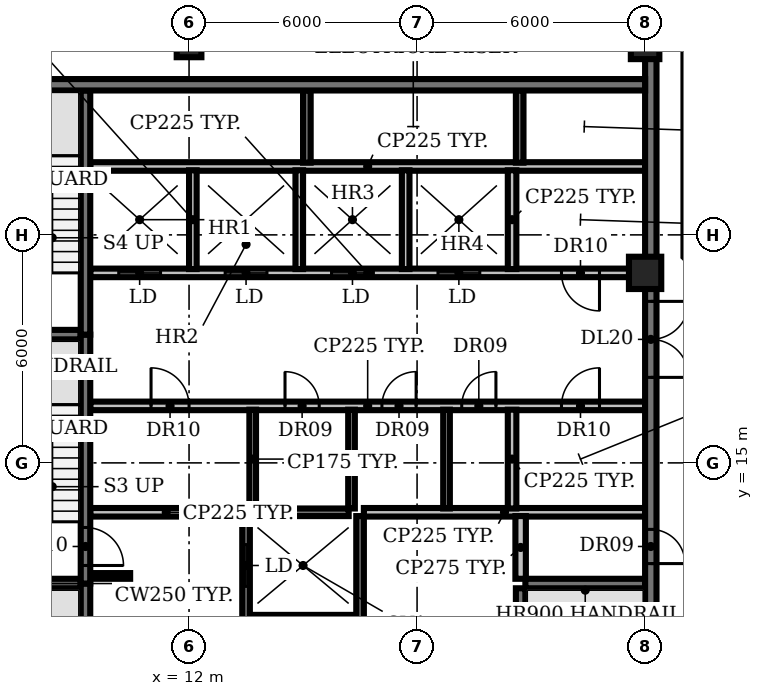
"""IFC4 building model, lengths in metres.
Left out: names, types, materials, properties, quantities, classifications, styles, units other than length and angle.
Written with IfcOpenShell. Run it as: python <this file> out.ifc"""

import sys

from ifc_helpers import new_model, si_unit, direction, frame, frame_2d, origin, origin_2d, place, context, subcontext, project, spatial, rectangle, circle, extrude, element, fill, save


model = new_model("IFC4")
c1 = context("Model", 3, precision=1e-05, world=origin(), true_north=direction((0.0, 1.0)))
c2 = subcontext(c1, "Body", "Model", "MODEL_VIEW")
j1 = project(units=[si_unit("LENGTHUNIT", "METRE"), si_unit("PLANEANGLEUNIT", "RADIAN")], contexts=[c1])
p1 = place(None, origin())
s1 = spatial("IfcSite", under=j1, at=p1, CompositionType="ELEMENT")
p2 = place(p1, origin())
s2 = spatial("IfcBuilding", under=s1, at=p2, CompositionType="ELEMENT")
p3 = place(p2, frame((0.0, 0.0, 281.0)))
s3 = spatial("IfcBuildingStorey", under=s2, at=p3, CompositionType="ELEMENT", Elevation=281.0)
p4 = place(p3, frame((12.0, 26.0, 0.0), z_axis=(0.0, 0.0, 1.0), x_axis=(1.0, 0.0, 0.0)))
e1 = element("IfcColumn", 1, at=p4, inside=s3, PredefinedType="COLUMN", context=c2, shape_type="SweptSolid", body=[
    extrude(rectangle(XDim=0.65, YDim=0.65, at=origin_2d()), origin(), (0.0, 0.0, 1.0), 3.85),
])
p5 = place(p3, frame((24.0, 20.0, 0.0), z_axis=(0.0, 0.0, 1.0), x_axis=(1.0, 0.0, 0.0)))
e2 = element("IfcColumn", 2, at=p5, inside=s3, PredefinedType="COLUMN", context=c2, shape_type="SweptSolid", body=[
    extrude(circle(Radius=0.425, at=origin_2d()), origin(), (0.0, 0.0, 1.0), 3.85),
])
p6 = place(p3, frame((24.0, 26.0, 0.0), z_axis=(0.0, 0.0, 1.0), x_axis=(1.0, 0.0, 0.0)))
e3 = element("IfcColumn", 3, at=p6, inside=s3, PredefinedType="COLUMN", context=c2, shape_type="SweptSolid", body=[
    extrude(rectangle(XDim=0.75, YDim=0.75, at=origin_2d()), origin(), (0.0, 0.0, 1.0), 3.85),
])
p7 = place(p3, frame((13.6, 10.9, 0.0), z_axis=(0.0, 0.0, 1.0), x_axis=(1.0, 0.0, 0.0)))
e4 = element("IfcWall", 4, at=p7, inside=s3, PredefinedType="SHEAR", context=c2, shape_type="SweptSolid", body=[
    extrude(rectangle(XDim=2.8, YDim=0.2, at=frame_2d((1.4, 0.0))), origin(), (0.0, 0.0, 1.0), 3.85),
])
for number, where, z_axis, x_axis in (
    (5, (6.0, 11.825, 0.0), (0.0, 0.0, 1.0), (1.0, 0.0, 0.0)),
    (6, (20.85, 11.825, 0.0), (0.0, 0.0, 1.0), (1.0, 0.0, 0.0)),
):
    element("IfcWall", number, at=place(p3, frame(where, z_axis=z_axis, x_axis=x_axis)), inside=s3, PredefinedType="SHEAR", context=c2, shape_type="SweptSolid", body=[
        extrude(rectangle(XDim=3.15, YDim=0.25, at=frame_2d((1.575, 0.0))), origin(), (0.0, 0.0, 1.0), 3.85),
    ])
p8 = place(p3, frame((9.4, 12.025, 0.0), z_axis=(0.0, 0.0, 1.0), x_axis=(1.0, 0.0, 0.0)))
e7 = element("IfcWall", 7, at=p8, inside=s3, PredefinedType="SHEAR", context=c2, shape_type="SweptSolid", body=[
    extrude(rectangle(XDim=1.05, YDim=0.15, at=frame_2d((0.525, 0.0))), origin(), (0.0, 0.0, 1.0), 3.85),
])
p9 = place(p3, frame((9.4, 13.7, 0.0), z_axis=(0.0, 0.0, 1.0), x_axis=(1.0, 0.0, 0.0)))
e8 = element("IfcWall", 8, at=p9, inside=s3, PredefinedType="PARTITIONING", context=c2, shape_type="SweptSolid", body=[
    extrude(rectangle(XDim=4.0, YDim=0.225, at=frame_2d((2.0, 0.0))), origin(), (0.0, 0.0, 1.0), 3.85),
])
p10 = place(p3, frame((13.75, 13.7, 0.0), z_axis=(0.0, 0.0, 1.0), x_axis=(1.0, 0.0, 0.0)))
e9 = element("IfcWall", 9, at=p10, inside=s3, PredefinedType="SHEAR", context=c2, shape_type="SweptSolid", body=[
    extrude(rectangle(XDim=2.45, YDim=0.2, at=frame_2d((1.225, 0.0))), origin(), (0.0, 0.0, 1.0), 3.85),
])
p11 = place(p3, frame((16.6, 13.7, 0.0), z_axis=(0.0, 0.0, 1.0), x_axis=(1.0, 0.0, 0.0)))
e10 = element("IfcWall", 10, at=p11, inside=s3, PredefinedType="PARTITIONING", context=c2, shape_type="SweptSolid", body=[
    extrude(rectangle(XDim=7.4, YDim=0.225, at=frame_2d((3.7, 0.0))), origin(), (0.0, 0.0, 1.0), 3.85),
])
p12 = place(p3, frame((9.4, 16.5, 0.0), z_axis=(0.0, 0.0, 1.0), x_axis=(1.0, 0.0, 0.0)))
e11 = element("IfcWall", 11, at=p12, inside=s3, PredefinedType="PARTITIONING", context=c2, shape_type="SweptSolid", body=[
    extrude(rectangle(XDim=14.6, YDim=0.225, at=frame_2d((7.3, 0.0))), origin(), (0.0, 0.0, 1.0), 3.85),
])
p13 = place(p12, frame((1.6, 0.0, 0.0)))
e12 = element("IfcOpeningElement", 12, at=p13, cuts=e11, PredefinedType="OPENING", context=c2, shape_type="SweptSolid", body=[
    extrude(rectangle(XDim=1.0, YDim=2.1, at=frame_2d((0.5, 1.05))), frame((0.0, 0.123, 0.0), z_axis=(0.0, -1.0, 0.0), x_axis=(1.0, 0.0, 0.0)), (0.0, 0.0, 1.0), 0.245),
])
p14 = place(p12, frame((5.125, 0.0, 0.0)))
e13 = element("IfcOpeningElement", 13, at=p14, cuts=e11, PredefinedType="OPENING", context=c2, shape_type="SweptSolid", body=[
    extrude(rectangle(XDim=0.9, YDim=2.1, at=frame_2d((0.45, 1.05))), frame((0.0, 0.123, 0.0), z_axis=(0.0, -1.0, 0.0), x_axis=(1.0, 0.0, 0.0)), (0.0, 0.0, 1.0), 0.245),
])
p15 = place(p12, frame((7.675, 0.0, 0.0)))
e14 = element("IfcOpeningElement", 14, at=p15, cuts=e11, PredefinedType="OPENING", context=c2, shape_type="SweptSolid", body=[
    extrude(rectangle(XDim=0.9, YDim=2.1, at=frame_2d((0.45, 1.05))), frame((0.0, 0.123, 0.0), z_axis=(0.0, -1.0, 0.0), x_axis=(1.0, 0.0, 0.0)), (0.0, 0.0, 1.0), 0.245),
])
p16 = place(p12, frame((9.775, 0.0, 0.0)))
e15 = element("IfcOpeningElement", 15, at=p16, cuts=e11, PredefinedType="OPENING", context=c2, shape_type="SweptSolid", body=[
    extrude(rectangle(XDim=0.9, YDim=2.1, at=frame_2d((0.45, 1.05))), frame((0.0, 0.123, 0.0), z_axis=(0.0, -1.0, 0.0), x_axis=(1.0, 0.0, 0.0)), (0.0, 0.0, 1.0), 0.245),
])
p17 = place(p12, frame((12.4, 0.0, 0.0)))
e16 = element("IfcOpeningElement", 16, at=p17, cuts=e11, PredefinedType="OPENING", context=c2, shape_type="SweptSolid", body=[
    extrude(rectangle(XDim=1.0, YDim=2.1, at=frame_2d((0.5, 1.05))), frame((0.0, 0.123, 0.0), z_axis=(0.0, -1.0, 0.0), x_axis=(1.0, 0.0, 0.0)), (0.0, 0.0, 1.0), 0.245),
])
p18 = place(p3, frame((6.0, 18.375, 0.0), z_axis=(0.0, 0.0, 1.0), x_axis=(1.0, 0.0, 0.0)))
e17 = element("IfcWall", 17, at=p18, inside=s3, PredefinedType="SHEAR", context=c2, shape_type="SweptSolid", body=[
    extrude(rectangle(XDim=3.15, YDim=0.25, at=frame_2d((1.575, 0.0))), origin(), (0.0, 0.0, 1.0), 3.85),
])
p19 = place(p3, frame((24.0, 20.0, 0.0), z_axis=(0.0, 0.0, 1.0), x_axis=(-1.0, 0.0, 0.0)))
e18 = element("IfcWall", 18, at=p19, inside=s3, PredefinedType="PARTITIONING", context=c2, shape_type="SweptSolid", body=[
    extrude(rectangle(XDim=14.6, YDim=0.225, at=frame_2d((7.3, 0.0))), origin(), (0.0, 0.0, 1.0), 3.85),
])
p20 = place(p19, frame((12.75, 0.0, 0.0)))
e19 = element("IfcOpeningElement", 19, at=p20, cuts=e18, PredefinedType="OPENING", context=c2, shape_type="SweptSolid", body=[
    extrude(rectangle(XDim=1.1, YDim=2.1, at=frame_2d((0.55, 1.05))), frame((0.0, 0.123, 0.0), z_axis=(0.0, -1.0, 0.0), x_axis=(1.0, 0.0, 0.0)), (0.0, 0.0, 1.0), 0.245),
])
p21 = place(p19, frame((9.95, 0.0, 0.0)))
e20 = element("IfcOpeningElement", 20, at=p21, cuts=e18, PredefinedType="OPENING", context=c2, shape_type="SweptSolid", body=[
    extrude(rectangle(XDim=1.1, YDim=2.1, at=frame_2d((0.55, 1.05))), frame((0.0, 0.123, 0.0), z_axis=(0.0, -1.0, 0.0), x_axis=(1.0, 0.0, 0.0)), (0.0, 0.0, 1.0), 0.245),
])
p22 = place(p19, frame((7.15, 0.0, 0.0)))
e21 = element("IfcOpeningElement", 21, at=p22, cuts=e18, PredefinedType="OPENING", context=c2, shape_type="SweptSolid", body=[
    extrude(rectangle(XDim=1.1, YDim=2.1, at=frame_2d((0.55, 1.05))), frame((0.0, 0.123, 0.0), z_axis=(0.0, -1.0, 0.0), x_axis=(1.0, 0.0, 0.0)), (0.0, 0.0, 1.0), 0.245),
])
p23 = place(p19, frame((4.35, 0.0, 0.0)))
e22 = element("IfcOpeningElement", 22, at=p23, cuts=e18, PredefinedType="OPENING", context=c2, shape_type="SweptSolid", body=[
    extrude(rectangle(XDim=1.1, YDim=2.1, at=frame_2d((0.55, 1.05))), frame((0.0, 0.123, 0.0), z_axis=(0.0, -1.0, 0.0), x_axis=(1.0, 0.0, 0.0)), (0.0, 0.0, 1.0), 0.245),
])
p24 = place(p19, frame((1.2, 0.0, 0.0)))
e23 = element("IfcOpeningElement", 23, at=p24, cuts=e18, PredefinedType="OPENING", context=c2, shape_type="SweptSolid", body=[
    extrude(rectangle(XDim=1.0, YDim=2.1, at=frame_2d((0.5, 1.05))), frame((0.0, 0.123, 0.0), z_axis=(0.0, -1.0, 0.0), x_axis=(1.0, 0.0, 0.0)), (0.0, 0.0, 1.0), 0.245),
])
p25 = place(p3, frame((9.4, 22.8, 0.0), z_axis=(0.0, 0.0, 1.0), x_axis=(1.0, 0.0, 0.0)))
e24 = element("IfcWall", 24, at=p25, inside=s3, PredefinedType="PARTITIONING", context=c2, shape_type="SweptSolid", body=[
    extrude(rectangle(XDim=14.6, YDim=0.225, at=frame_2d((7.3, 0.0))), origin(), (0.0, 0.0, 1.0), 3.85),
])
p26 = place(p3, frame((9.275, 11.825, 0.0), z_axis=(0.0, 0.0, 1.0), x_axis=(0.0, -1.0, 0.0)))
e25 = element("IfcWall", 25, at=p26, inside=s3, PredefinedType="SHEAR", context=c2, shape_type="SweptSolid", body=[
    extrude(rectangle(XDim=6.425, YDim=0.25, at=frame_2d((3.212, 0.0))), origin(), (0.0, 0.0, 1.0), 3.85),
])
p27 = place(p26, frame((5.075, 0.0, 0.0)))
e26 = element("IfcOpeningElement", 26, at=p27, cuts=e25, PredefinedType="OPENING", context=c2, shape_type="SweptSolid", body=[
    extrude(rectangle(XDim=1.0, YDim=2.1, at=frame_2d((0.5, 1.05))), frame((0.0, 0.135, 0.0), z_axis=(0.0, -1.0, 0.0), x_axis=(1.0, 0.0, 0.0)), (0.0, 0.0, 1.0), 0.27),
])
p28 = place(p3, frame((9.275, 18.375, 0.0), z_axis=(0.0, 0.0, 1.0), x_axis=(0.0, -1.0, 0.0)))
e27 = element("IfcWall", 27, at=p28, inside=s3, PredefinedType="SHEAR", context=c2, shape_type="SweptSolid", body=[
    extrude(rectangle(XDim=6.55, YDim=0.25, at=frame_2d((3.275, 0.0))), origin(), (0.0, 0.0, 1.0), 3.85),
])
p29 = place(p28, frame((5.075, 0.0, 0.0)))
e28 = element("IfcOpeningElement", 28, at=p29, cuts=e27, PredefinedType="OPENING", context=c2, shape_type="SweptSolid", body=[
    extrude(rectangle(XDim=1.0, YDim=2.1, at=frame_2d((0.5, 1.05))), frame((0.0, 0.135, 0.0), z_axis=(0.0, -1.0, 0.0), x_axis=(1.0, 0.0, 0.0)), (0.0, 0.0, 1.0), 0.27),
])
p30 = place(p3, frame((9.275, 18.375, 0.0), z_axis=(0.0, 0.0, 1.0), x_axis=(0.0, 1.0, 0.0)))
e29 = element("IfcWall", 29, at=p30, inside=s3, PredefinedType="SHEAR", context=c2, shape_type="SweptSolid", body=[
    extrude(rectangle(XDim=6.425, YDim=0.25, at=frame_2d((3.212, 0.0))), origin(), (0.0, 0.0, 1.0), 3.85),
])
p31 = place(p3, frame((12.1, 20.1, 0.0), z_axis=(0.0, 0.0, 1.0), x_axis=(0.0, 1.0, 0.0)))
e30 = element("IfcWall", 30, at=p31, inside=s3, PredefinedType="SOLIDWALL", context=c2, shape_type="SweptSolid", body=[
    extrude(rectangle(XDim=2.6, YDim=0.2, at=frame_2d((1.3, 0.0))), origin(), (0.0, 0.0, 1.0), 3.85),
])
p32 = place(p3, frame((13.5, 5.4, 0.0), z_axis=(0.0, 0.0, 1.0), x_axis=(0.0, 1.0, 0.0)))
e31 = element("IfcWall", 31, at=p32, inside=s3, PredefinedType="SHEAR", context=c2, shape_type="SweptSolid", body=[
    extrude(rectangle(XDim=8.2, YDim=0.2, at=frame_2d((4.1, 0.0))), origin(), (0.0, 0.0, 1.0), 3.85),
])
p33 = place(p32, frame((0.75, 0.0, 0.0)))
e32 = element("IfcOpeningElement", 32, at=p33, cuts=e31, PredefinedType="OPENING", context=c2, shape_type="SweptSolid", body=[
    extrude(rectangle(XDim=1.1, YDim=2.1, at=frame_2d((0.55, 1.05))), frame((0.0, 0.11, 0.0), z_axis=(0.0, -1.0, 0.0), x_axis=(1.0, 0.0, 0.0)), (0.0, 0.0, 1.0), 0.22),
])
p34 = place(p32, frame((3.55, 0.0, 0.0)))
e33 = element("IfcOpeningElement", 33, at=p34, cuts=e31, PredefinedType="OPENING", context=c2, shape_type="SweptSolid", body=[
    extrude(rectangle(XDim=1.1, YDim=2.1, at=frame_2d((0.55, 1.05))), frame((0.0, 0.11, 0.0), z_axis=(0.0, -1.0, 0.0), x_axis=(1.0, 0.0, 0.0)), (0.0, 0.0, 1.0), 0.22),
])
p35 = place(p32, frame((6.35, 0.0, 0.0)))
e34 = element("IfcOpeningElement", 34, at=p35, cuts=e31, PredefinedType="OPENING", context=c2, shape_type="SweptSolid", body=[
    extrude(rectangle(XDim=1.1, YDim=2.1, at=frame_2d((0.55, 1.05))), frame((0.0, 0.11, 0.0), z_axis=(0.0, -1.0, 0.0), x_axis=(1.0, 0.0, 0.0)), (0.0, 0.0, 1.0), 0.22),
])
p36 = place(p3, frame((13.675, 13.8, 0.0), z_axis=(0.0, 0.0, 1.0), x_axis=(0.0, 1.0, 0.0)))
e35 = element("IfcWall", 35, at=p36, inside=s3, PredefinedType="PARTITIONING", context=c2, shape_type="SweptSolid", body=[
    extrude(rectangle(XDim=2.6, YDim=0.175, at=frame_2d((1.3, 0.0))), origin(), (0.0, 0.0, 1.0), 3.85),
])
p37 = place(p3, frame((14.9, 20.1, 0.0), z_axis=(0.0, 0.0, 1.0), x_axis=(0.0, 1.0, 0.0)))
e36 = element("IfcWall", 36, at=p37, inside=s3, PredefinedType="SOLIDWALL", context=c2, shape_type="SweptSolid", body=[
    extrude(rectangle(XDim=2.6, YDim=0.2, at=frame_2d((1.3, 0.0))), origin(), (0.0, 0.0, 1.0), 3.85),
])
p38 = place(p3, frame((15.1, 22.9, 0.0), z_axis=(0.0, 0.0, 1.0), x_axis=(0.0, 1.0, 0.0)))
e37 = element("IfcWall", 37, at=p38, inside=s3, PredefinedType="SHEAR", context=c2, shape_type="SweptSolid", body=[
    extrude(rectangle(XDim=1.9, YDim=0.2, at=frame_2d((0.95, 0.0))), origin(), (0.0, 0.0, 1.0), 3.85),
])
p39 = place(p3, frame((16.275, 13.8, 0.0), z_axis=(0.0, 0.0, 1.0), x_axis=(0.0, 1.0, 0.0)))
e38 = element("IfcWall", 38, at=p39, inside=s3, PredefinedType="PARTITIONING", context=c2, shape_type="SweptSolid", body=[
    extrude(rectangle(XDim=2.6, YDim=0.175, at=frame_2d((1.3, 0.0))), origin(), (0.0, 0.0, 1.0), 3.85),
])
p40 = place(p3, frame((16.5, 5.4, 0.0), z_axis=(0.0, 0.0, 1.0), x_axis=(0.0, 1.0, 0.0)))
e39 = element("IfcWall", 39, at=p40, inside=s3, PredefinedType="SHEAR", context=c2, shape_type="SweptSolid", body=[
    extrude(rectangle(XDim=8.2, YDim=0.2, at=frame_2d((4.1, 0.0))), origin(), (0.0, 0.0, 1.0), 3.85),
])
p41 = place(p3, frame((17.7, 20.1, 0.0), z_axis=(0.0, 0.0, 1.0), x_axis=(0.0, 1.0, 0.0)))
e40 = element("IfcWall", 40, at=p41, inside=s3, PredefinedType="SOLIDWALL", context=c2, shape_type="SweptSolid", body=[
    extrude(rectangle(XDim=2.6, YDim=0.2, at=frame_2d((1.3, 0.0))), origin(), (0.0, 0.0, 1.0), 3.85),
])
p42 = place(p3, frame((18.775, 13.8, 0.0), z_axis=(0.0, 0.0, 1.0), x_axis=(0.0, 1.0, 0.0)))
e41 = element("IfcWall", 41, at=p42, inside=s3, PredefinedType="PARTITIONING", context=c2, shape_type="SweptSolid", body=[
    extrude(rectangle(XDim=2.6, YDim=0.175, at=frame_2d((1.3, 0.0))), origin(), (0.0, 0.0, 1.0), 3.85),
])
for number, where, z_axis, x_axis in (
    (42, (20.5, 13.8, 0.0), (0.0, 0.0, 1.0), (0.0, 1.0, 0.0)),
    (43, (20.5, 20.1, 0.0), (0.0, 0.0, 1.0), (0.0, 1.0, 0.0)),
):
    element("IfcWall", number, at=place(p3, frame(where, z_axis=z_axis, x_axis=x_axis)), inside=s3, PredefinedType="PARTITIONING", context=c2, shape_type="SweptSolid", body=[
        extrude(rectangle(XDim=2.6, YDim=0.225, at=frame_2d((1.3, 0.0))), origin(), (0.0, 0.0, 1.0), 3.85),
    ])
p43 = place(p3, frame((20.7, 22.9, 0.0), z_axis=(0.0, 0.0, 1.0), x_axis=(0.0, 1.0, 0.0)))
e44 = element("IfcWall", 44, at=p43, inside=s3, PredefinedType="SHEAR", context=c2, shape_type="SweptSolid", body=[
    extrude(rectangle(XDim=1.9, YDim=0.2, at=frame_2d((0.95, 0.0))), origin(), (0.0, 0.0, 1.0), 3.85),
])
p44 = place(p3, frame((20.725, 5.4, 0.0), z_axis=(0.0, 0.0, 1.0), x_axis=(0.0, 1.0, 0.0)))
e45 = element("IfcWall", 45, at=p44, inside=s3, PredefinedType="SHEAR", context=c2, shape_type="SweptSolid", body=[
    extrude(rectangle(XDim=6.3, YDim=0.25, at=frame_2d((3.15, 0.0))), origin(), (0.0, 0.0, 1.0), 3.85),
])
p45 = place(p3, frame((20.725, 11.95, 0.0), z_axis=(0.0, 0.0, 1.0), x_axis=(0.0, 1.0, 0.0)))
e46 = element("IfcWall", 46, at=p45, inside=s3, PredefinedType="PARTITIONING", context=c2, shape_type="SweptSolid", body=[
    extrude(rectangle(XDim=1.65, YDim=0.275, at=frame_2d((0.825, 0.0))), origin(), (0.0, 0.0, 1.0), 3.85),
])
p46 = place(p3, frame((24.15, 25.655, 0.0), z_axis=(0.0, 0.0, 1.0), x_axis=(0.0, -1.0, 0.0)))
e47 = element("IfcWall", 47, at=p46, inside=s3, PredefinedType="SHEAR", context=c2, shape_type="SweptSolid", body=[
    extrude(rectangle(XDim=20.555, YDim=0.3, at=frame_2d((10.277, 0.0))), origin(), (0.0, 0.0, 1.0), 3.85),
])
p47 = place(p46, frame((18.505, 0.0, 0.0)))
e48 = element("IfcOpeningElement", 48, at=p47, cuts=e47, PredefinedType="OPENING", context=c2, shape_type="SweptSolid", body=[
    extrude(rectangle(XDim=1.5, YDim=2.1, at=frame_2d((0.75, 1.05))), frame((0.0, 0.16, 0.0), z_axis=(0.0, -1.0, 0.0), x_axis=(1.0, 0.0, 0.0)), (0.0, 0.0, 1.0), 0.32),
])
p48 = place(p46, frame((12.405, 0.0, 0.0)))
e49 = element("IfcOpeningElement", 49, at=p48, cuts=e47, PredefinedType="OPENING", context=c2, shape_type="SweptSolid", body=[
    extrude(rectangle(XDim=0.9, YDim=2.1, at=frame_2d((0.45, 1.05))), frame((0.0, 0.16, 0.0), z_axis=(0.0, -1.0, 0.0), x_axis=(1.0, 0.0, 0.0)), (0.0, 0.0, 1.0), 0.32),
])
p49 = place(p46, frame((6.405, 0.0, 0.0)))
e50 = element("IfcOpeningElement", 50, at=p49, cuts=e47, PredefinedType="OPENING", context=c2, shape_type="SweptSolid", body=[
    extrude(rectangle(XDim=2.0, YDim=2.1, at=frame_2d((1.0, 1.05))), frame((0.0, 0.16, 0.0), z_axis=(0.0, -1.0, 0.0), x_axis=(1.0, 0.0, 0.0)), (0.0, 0.0, 1.0), 0.32),
])
p50 = place(p3, frame((6.0, 24.95, 0.0), z_axis=(0.0, 0.0, 1.0), x_axis=(1.0, 0.0, 0.0)))
e51 = element("IfcWall", 51, at=p50, inside=s3, PredefinedType="SHEAR", context=c2, shape_type="SweptSolid", body=[
    extrude(rectangle(XDim=18.0, YDim=0.3, at=frame_2d((9.0, 0.0))), origin(), (0.0, 0.0, 1.0), 3.85),
])
p51 = place(p13, origin())
e52 = element("IfcDoor", 52, at=p51, inside=s3, OperationType="SINGLE_SWING_LEFT", PredefinedType="DOOR", context=c2, shape_type="SweptSolid", body=[
    extrude(rectangle(XDim=1.0, YDim=2.1, at=frame_2d((0.5, 1.05))), frame((0.0, 0.025, 0.0), z_axis=(0.0, -1.0, 0.0), x_axis=(1.0, 0.0, 0.0)), (0.0, 0.0, 1.0), 0.05),
])
fill(e12, e52)
p52 = place(p14, origin())
e53 = element("IfcDoor", 53, at=p52, inside=s3, OperationType="SINGLE_SWING_LEFT", PredefinedType="DOOR", context=c2, shape_type="SweptSolid", body=[
    extrude(rectangle(XDim=0.9, YDim=2.1, at=frame_2d((0.45, 1.05))), frame((0.0, 0.025, 0.0), z_axis=(0.0, -1.0, 0.0), x_axis=(1.0, 0.0, 0.0)), (0.0, 0.0, 1.0), 0.05),
])
fill(e13, e53)
p53 = place(p15, origin())
e54 = element("IfcDoor", 54, at=p53, inside=s3, OperationType="SINGLE_SWING_RIGHT", PredefinedType="DOOR", context=c2, shape_type="SweptSolid", body=[
    extrude(rectangle(XDim=0.9, YDim=2.1, at=frame_2d((0.45, 1.05))), frame((0.0, 0.025, 0.0), z_axis=(0.0, -1.0, 0.0), x_axis=(1.0, 0.0, 0.0)), (0.0, 0.0, 1.0), 0.05),
])
fill(e14, e54)
p54 = place(p16, origin())
e55 = element("IfcDoor", 55, at=p54, inside=s3, OperationType="SINGLE_SWING_RIGHT", PredefinedType="DOOR", context=c2, shape_type="SweptSolid", body=[
    extrude(rectangle(XDim=0.9, YDim=2.1, at=frame_2d((0.45, 1.05))), frame((0.0, 0.025, 0.0), z_axis=(0.0, -1.0, 0.0), x_axis=(1.0, 0.0, 0.0)), (0.0, 0.0, 1.0), 0.05),
])
fill(e15, e55)
p55 = place(p17, origin())
e56 = element("IfcDoor", 56, at=p55, inside=s3, OperationType="SINGLE_SWING_RIGHT", PredefinedType="DOOR", context=c2, shape_type="SweptSolid", body=[
    extrude(rectangle(XDim=1.0, YDim=2.1, at=frame_2d((0.5, 1.05))), frame((0.0, 0.025, 0.0), z_axis=(0.0, -1.0, 0.0), x_axis=(1.0, 0.0, 0.0)), (0.0, 0.0, 1.0), 0.05),
])
fill(e16, e56)
p56 = place(p20, origin())
e57 = element("IfcDoor", 57, at=p56, inside=s3, OperationType="DOUBLE_DOOR_SLIDING", PredefinedType="DOOR", context=c2, shape_type="SweptSolid", body=[
    extrude(rectangle(XDim=1.1, YDim=2.1, at=frame_2d((0.55, 1.05))), frame((0.0, 0.025, 0.0), z_axis=(0.0, -1.0, 0.0), x_axis=(1.0, 0.0, 0.0)), (0.0, 0.0, 1.0), 0.05),
])
fill(e19, e57)
p57 = place(p21, origin())
e58 = element("IfcDoor", 58, at=p57, inside=s3, OperationType="DOUBLE_DOOR_SLIDING", PredefinedType="DOOR", context=c2, shape_type="SweptSolid", body=[
    extrude(rectangle(XDim=1.1, YDim=2.1, at=frame_2d((0.55, 1.05))), frame((0.0, 0.025, 0.0), z_axis=(0.0, -1.0, 0.0), x_axis=(1.0, 0.0, 0.0)), (0.0, 0.0, 1.0), 0.05),
])
fill(e20, e58)
p58 = place(p22, origin())
e59 = element("IfcDoor", 59, at=p58, inside=s3, OperationType="DOUBLE_DOOR_SLIDING", PredefinedType="DOOR", context=c2, shape_type="SweptSolid", body=[
    extrude(rectangle(XDim=1.1, YDim=2.1, at=frame_2d((0.55, 1.05))), frame((0.0, 0.025, 0.0), z_axis=(0.0, -1.0, 0.0), x_axis=(1.0, 0.0, 0.0)), (0.0, 0.0, 1.0), 0.05),
])
fill(e21, e59)
p59 = place(p23, origin())
e60 = element("IfcDoor", 60, at=p59, inside=s3, OperationType="DOUBLE_DOOR_SLIDING", PredefinedType="DOOR", context=c2, shape_type="SweptSolid", body=[
    extrude(rectangle(XDim=1.1, YDim=2.1, at=frame_2d((0.55, 1.05))), frame((0.0, 0.025, 0.0), z_axis=(0.0, -1.0, 0.0), x_axis=(1.0, 0.0, 0.0)), (0.0, 0.0, 1.0), 0.05),
])
fill(e22, e60)
p60 = place(p24, origin())
e61 = element("IfcDoor", 61, at=p60, inside=s3, OperationType="SINGLE_SWING_LEFT", PredefinedType="DOOR", context=c2, shape_type="SweptSolid", body=[
    extrude(rectangle(XDim=1.0, YDim=2.1, at=frame_2d((0.5, 1.05))), frame((0.0, 0.025, 0.0), z_axis=(0.0, -1.0, 0.0), x_axis=(1.0, 0.0, 0.0)), (0.0, 0.0, 1.0), 0.05),
])
fill(e23, e61)
p61 = place(p29, origin())
e62 = element("IfcDoor", 62, at=p61, inside=s3, OperationType="SINGLE_SWING_RIGHT", PredefinedType="DOOR", context=c2, shape_type="SweptSolid", body=[
    extrude(rectangle(XDim=1.0, YDim=2.1, at=frame_2d((0.5, 1.05))), frame((0.0, 0.025, 0.0), z_axis=(0.0, -1.0, 0.0), x_axis=(1.0, 0.0, 0.0)), (0.0, 0.0, 1.0), 0.05),
])
fill(e28, e62)
p62 = place(p35, origin())
e63 = element("IfcDoor", 63, at=p62, inside=s3, OperationType="DOUBLE_DOOR_SLIDING", PredefinedType="DOOR", context=c2, shape_type="SweptSolid", body=[
    extrude(rectangle(XDim=1.1, YDim=2.1, at=frame_2d((0.55, 1.05))), frame((0.0, 0.025, 0.0), z_axis=(0.0, -1.0, 0.0), x_axis=(1.0, 0.0, 0.0)), (0.0, 0.0, 1.0), 0.05),
])
fill(e34, e63)
p63 = place(p48, origin())
e64 = element("IfcDoor", 64, at=p63, inside=s3, OperationType="SINGLE_SWING_RIGHT", PredefinedType="DOOR", context=c2, shape_type="SweptSolid", body=[
    extrude(rectangle(XDim=0.9, YDim=2.1, at=frame_2d((0.45, 1.05))), frame((0.0, 0.025, 0.0), z_axis=(0.0, -1.0, 0.0), x_axis=(1.0, 0.0, 0.0)), (0.0, 0.0, 1.0), 0.05),
])
fill(e49, e64)
p64 = place(p49, origin())
e65 = element("IfcDoor", 65, at=p64, inside=s3, OperationType="DOUBLE_DOOR_SINGLE_SWING", PredefinedType="DOOR", context=c2, shape_type="SweptSolid", body=[
    extrude(rectangle(XDim=2.0, YDim=2.1, at=frame_2d((1.0, 1.05))), frame((0.0, 0.025, 0.0), z_axis=(0.0, -1.0, 0.0), x_axis=(1.0, 0.0, 0.0)), (0.0, 0.0, 1.0), 0.05),
])
fill(e50, e65)
save(model, sys.argv[1])
